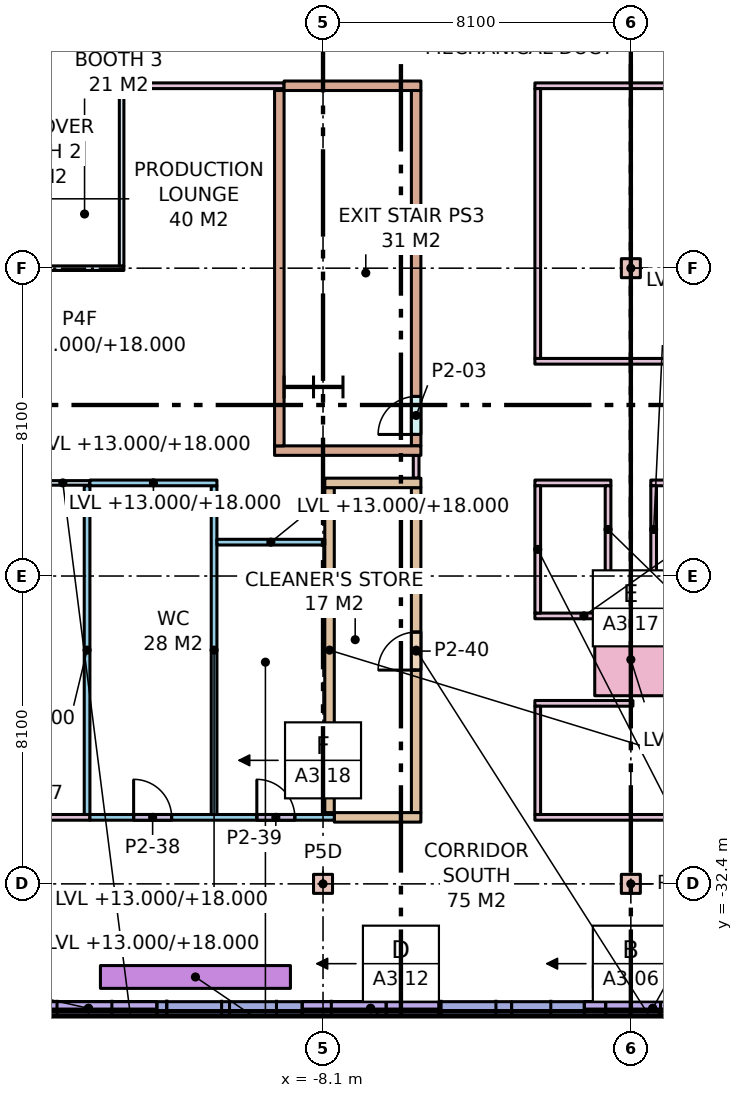
"""IFC4 building model, lengths in metres.
Left out: names, types, materials, properties, quantities, classifications, styles, units other than length and angle.
Written with IfcOpenShell. Run it as: python <this file> out.ifc"""

import sys

from ifc_helpers import new_model, si_unit, direction, frame, frame_2d, origin, origin_2d, place, context, subcontext, project, spatial, rectangle, extrude, element, fill, save


model = new_model("IFC4")
c1 = context("Model", 3, precision=1e-05, world=origin(), true_north=direction((0.0, 1.0)))
c2 = subcontext(c1, "Body", "Model", "MODEL_VIEW")
j1 = project(units=[si_unit("LENGTHUNIT", "METRE"), si_unit("PLANEANGLEUNIT", "RADIAN")], contexts=[c1])
p1 = place(None, origin())
s1 = spatial("IfcSite", under=j1, at=p1, CompositionType="ELEMENT")
p2 = place(p1, origin())
s2 = spatial("IfcBuilding", under=s1, at=p2, CompositionType="ELEMENT")
p3 = place(p2, frame((0.0, 0.0, 13.0)))
s3 = spatial("IfcBuildingStorey", under=s2, at=p3, CompositionType="ELEMENT", Elevation=13.0)
for number, where, z_axis, x_axis in (
    (1, (-8.1, -32.4, 0.0), (0.0, 0.0, 1.0), (1.0, 0.0, 0.0)),
    (2, (0.0, -32.4, 0.0), (0.0, 0.0, 1.0), (1.0, 0.0, 0.0)),
):
    element("IfcColumn", number, at=place(p3, frame(where, z_axis=z_axis, x_axis=x_axis)), inside=s3, PredefinedType="COLUMN", context=c2, shape_type="SweptSolid", body=[
        extrude(rectangle(XDim=0.5, YDim=0.5, at=origin_2d()), origin(), (0.0, 0.0, 1.0), 7.0),
    ])
p4 = place(p3, frame((0.0, -16.2, 0.0), z_axis=(0.0, 0.0, 1.0), x_axis=(1.0, 0.0, 0.0)))
e3 = element("IfcColumn", 3, at=p4, inside=s3, PredefinedType="COLUMN", context=c2, shape_type="SweptSolid", body=[
    extrude(rectangle(XDim=0.5, YDim=0.5, at=origin_2d()), origin(), (0.0, 0.0, 1.0), 5.0),
])
p5 = place(p3, frame((0.0, -26.5, 0.0), z_axis=(0.0, 0.0, 1.0), x_axis=(1.0, 0.0, 0.0)))
e4 = element("IfcColumn", 4, at=p5, inside=s3, PredefinedType="COLUMN", context=c2, shape_type="SweptSolid", body=[
    extrude(rectangle(XDim=1.9, YDim=1.9, at=origin_2d()), origin(), (0.0, 0.0, 1.0), 5.0),
])
p6 = place(p3, frame((-17.984, -35.675, 0.0), z_axis=(0.0, 0.0, 1.0), x_axis=(1.0, 0.0, 0.0)))
e5 = element("IfcWall", 5, at=p6, inside=s3, PredefinedType="STANDARD", context=c2, shape_type="SweptSolid", body=[
    extrude(rectangle(XDim=7.424, YDim=0.35, at=frame_2d((3.712, 0.0))), origin(), (0.0, 0.0, 1.0), 5.0),
])
p7 = place(p6, frame((1.912, 0.0, 1.0)))
e6 = element("IfcOpeningElement", 6, at=p7, cuts=e5, PredefinedType="OPENING", context=c2, shape_type="SweptSolid", body=[
    extrude(rectangle(XDim=3.6, YDim=4.0, at=frame_2d((1.8, 2.0))), frame((0.0, 0.185, 0.0), z_axis=(0.0, -1.0, 0.0), x_axis=(1.0, 0.0, 0.0)), (0.0, 0.0, 1.0), 0.37),
])
p8 = place(p3, frame((-10.56, -35.675, 0.0), z_axis=(0.0, 0.0, 1.0), x_axis=(1.0, 0.0, 0.0)))
e7 = element("IfcWall", 7, at=p8, inside=s3, PredefinedType="STANDARD", context=c2, shape_type="SweptSolid", body=[
    extrude(rectangle(XDim=7.424, YDim=0.35, at=frame_2d((3.712, 0.0))), origin(), (0.0, 0.0, 1.0), 5.0),
])
p9 = place(p8, frame((1.912, 0.0, 1.0)))
e8 = element("IfcOpeningElement", 8, at=p9, cuts=e7, PredefinedType="OPENING", context=c2, shape_type="SweptSolid", body=[
    extrude(rectangle(XDim=3.6, YDim=4.0, at=frame_2d((1.8, 2.0))), frame((0.0, 0.185, 0.0), z_axis=(0.0, -1.0, 0.0), x_axis=(1.0, 0.0, 0.0)), (0.0, 0.0, 1.0), 0.37),
])
p10 = place(p3, frame((-3.136, -35.675, 0.0), z_axis=(0.0, 0.0, 1.0), x_axis=(1.0, 0.0, 0.0)))
e9 = element("IfcWall", 9, at=p10, inside=s3, PredefinedType="STANDARD", context=c2, shape_type="SweptSolid", body=[
    extrude(rectangle(XDim=7.424, YDim=0.35, at=frame_2d((3.712, 0.0))), origin(), (0.0, 0.0, 1.0), 5.0),
])
p11 = place(p10, frame((1.912, 0.0, 1.0)))
e10 = element("IfcOpeningElement", 10, at=p11, cuts=e9, PredefinedType="OPENING", context=c2, shape_type="SweptSolid", body=[
    extrude(rectangle(XDim=3.6, YDim=4.0, at=frame_2d((1.8, 2.0))), frame((0.0, 0.185, 0.0), z_axis=(0.0, -1.0, 0.0), x_axis=(1.0, 0.0, 0.0)), (0.0, 0.0, 1.0), 0.37),
])
for number, where, z_axis, x_axis in (
    (11, (-13.958, -34.85, 7.0), (0.0, 0.0, 1.0), (1.0, 0.0, 0.0)),
    (12, (-0.986, -34.85, 7.0), (0.0, 0.0, 1.0), (1.0, 0.0, 0.0)),
):
    element("IfcWall", number, at=place(p3, frame(where, z_axis=z_axis, x_axis=x_axis)), inside=s3, PredefinedType="PARAPET", context=c2, shape_type="SweptSolid", body=[
        extrude(rectangle(XDim=5.0, YDim=0.6, at=frame_2d((2.5, 0.0))), origin(), (0.0, 0.0, 1.0), 0.9),
    ])
p12 = place(p3, frame((-0.675, -24.3, 0.0), z_axis=(0.0, 0.0, 1.0), x_axis=(1.0, 0.0, 0.0)))
e13 = element("IfcWall", 13, at=p12, inside=s3, PredefinedType="PARTITIONING", context=c2, shape_type="SweptSolid", body=[
    extrude(rectangle(XDim=1.35, YDim=0.15, at=frame_2d((0.675, 0.0))), origin(), (0.0, 0.0, 1.0), 6.68),
])
p13 = place(p3, frame((-2.525, -21.85, 0.0), z_axis=(0.0, 0.0, 1.0), x_axis=(1.0, 0.0, 0.0)))
e14 = element("IfcWall", 14, at=p13, inside=s3, PredefinedType="PARTITIONING", context=c2, shape_type="SweptSolid", body=[
    extrude(rectangle(XDim=2.0, YDim=0.15, at=frame_2d((1.0, 0.0))), origin(), (0.0, 0.0, 1.0), 5.0),
])
p14 = place(p3, frame((0.525, -21.85, 0.0), z_axis=(0.0, 0.0, 1.0), x_axis=(1.0, 0.0, 0.0)))
e15 = element("IfcWall", 15, at=p14, inside=s3, PredefinedType="PARTITIONING", context=c2, shape_type="SweptSolid", body=[
    extrude(rectangle(XDim=15.15, YDim=0.15, at=frame_2d((7.575, 0.0))), origin(), (0.0, 0.0, 1.0), 5.0),
])
p15 = place(p14, frame((4.35, 0.0, 0.0)))
e16 = element("IfcOpeningElement", 16, at=p15, cuts=e15, PredefinedType="OPENING", context=c2, shape_type="SweptSolid", body=[
    extrude(rectangle(XDim=1.0, YDim=2.1, at=frame_2d((0.5, 1.05))), frame((0.0, 0.085, 0.0), z_axis=(0.0, -1.0, 0.0), x_axis=(1.0, 0.0, 0.0)), (0.0, 0.0, 1.0), 0.17),
])
p16 = place(p14, frame((11.924, 0.0, 0.0)))
e17 = element("IfcOpeningElement", 17, at=p16, cuts=e15, PredefinedType="OPENING", context=c2, shape_type="SweptSolid", body=[
    extrude(rectangle(XDim=1.0, YDim=2.1, at=frame_2d((0.5, 1.05))), frame((0.0, 0.085, 0.0), z_axis=(0.0, -1.0, 0.0), x_axis=(1.0, 0.0, 0.0)), (0.0, 0.0, 1.0), 0.17),
])
for number, where, z_axis, x_axis in (
    (18, (-0.6, -24.225, 0.0), (0.0, 0.0, 1.0), (0.0, 1.0, 0.0)),
    (19, (0.6, -24.225, 0.0), (0.0, 0.0, 1.0), (0.0, 1.0, 0.0)),
):
    element("IfcWall", number, at=place(p3, frame(where, z_axis=z_axis, x_axis=x_axis)), inside=s3, PredefinedType="PARTITIONING", context=c2, shape_type="SweptSolid", body=[
        extrude(rectangle(XDim=2.3, YDim=0.15, at=frame_2d((1.15, 0.0))), origin(), (0.0, 0.0, 1.0), 5.0),
    ])
p17 = place(p3, frame((-2.525, -30.65, 0.0), z_axis=(0.0, 0.0, 1.0), x_axis=(1.0, 0.0, 0.0)))
e20 = element("IfcWall", 20, at=p17, inside=s3, PredefinedType="PARTITIONING", context=c2, shape_type="SweptSolid", body=[
    extrude(rectangle(XDim=25.378, YDim=0.15, at=frame_2d((12.689, 0.0))), origin(), (0.0, 0.0, 1.0), 6.68),
])
p18 = place(p3, frame((-2.525, -27.65, 0.0), z_axis=(0.0, 0.0, 1.0), x_axis=(1.0, 0.0, 0.0)))
e21 = element("IfcWall", 21, at=p18, inside=s3, PredefinedType="PARTITIONING", context=c2, shape_type="SweptSolid", body=[
    extrude(rectangle(XDim=2.58, YDim=0.15, at=frame_2d((1.29, 0.0))), origin(), (0.0, 0.0, 1.0), 6.68),
])
p19 = place(p3, frame((-2.525, -25.35, 0.0), z_axis=(0.0, 0.0, 1.0), x_axis=(1.0, 0.0, 0.0)))
e22 = element("IfcWall", 22, at=p19, inside=s3, PredefinedType="PARTITIONING", context=c2, shape_type="SweptSolid", body=[
    extrude(rectangle(XDim=2.58, YDim=0.15, at=frame_2d((1.29, 0.0))), origin(), (0.0, 0.0, 1.0), 5.0),
])
p20 = place(p3, frame((-2.45, -30.575, 0.0), z_axis=(0.0, 0.0, 1.0), x_axis=(0.0, 1.0, 0.0)))
e23 = element("IfcWall", 23, at=p20, inside=s3, PredefinedType="PARTITIONING", context=c2, shape_type="SweptSolid", body=[
    extrude(rectangle(XDim=2.85, YDim=0.15, at=frame_2d((1.425, 0.0))), origin(), (0.0, 0.0, 1.0), 6.68),
])
p21 = place(p3, frame((-2.45, -25.275, 0.0), z_axis=(0.0, 0.0, 1.0), x_axis=(0.0, 1.0, 0.0)))
e24 = element("IfcWall", 24, at=p21, inside=s3, PredefinedType="PARTITIONING", context=c2, shape_type="SweptSolid", body=[
    extrude(rectangle(XDim=3.35, YDim=0.15, at=frame_2d((1.675, 0.0))), origin(), (0.0, 0.0, 1.0), 5.0),
])
p22 = place(p3, frame((-9.125, -11.4, 0.0), z_axis=(0.0, 0.0, 1.0), x_axis=(1.0, 0.0, 0.0)))
e25 = element("IfcWall", 25, at=p22, inside=s3, PredefinedType="STANDARD", context=c2, shape_type="SweptSolid", body=[
    extrude(rectangle(XDim=3.6, YDim=0.25, at=frame_2d((1.8, 0.0))), origin(), (0.0, 0.0, 1.0), 5.0),
])
p23 = place(p3, frame((-5.65, -20.875, 0.0), z_axis=(0.0, 0.0, 1.0), x_axis=(0.0, 1.0, 0.0)))
e26 = element("IfcWall", 26, at=p23, inside=s3, PredefinedType="STANDARD", context=c2, shape_type="SweptSolid", body=[
    extrude(rectangle(XDim=9.35, YDim=0.25, at=frame_2d((4.675, 0.0))), origin(), (0.0, 0.0, 1.0), 5.0),
])
p24 = place(p23, frame((0.3, 0.0, 0.0)))
e27 = element("IfcOpeningElement", 27, at=p24, cuts=e26, PredefinedType="OPENING", context=c2, shape_type="SweptSolid", body=[
    extrude(rectangle(XDim=1.0, YDim=2.1, at=frame_2d((0.5, 1.05))), frame((0.0, 0.135, 0.0), z_axis=(0.0, -1.0, 0.0), x_axis=(1.0, 0.0, 0.0)), (0.0, 0.0, 1.0), 0.27),
])
p25 = place(p3, frame((-9.375, -21.0, 0.0), z_axis=(0.0, 0.0, 1.0), x_axis=(1.0, 0.0, 0.0)))
e28 = element("IfcWall", 28, at=p25, inside=s3, PredefinedType="STANDARD", context=c2, shape_type="SweptSolid", body=[
    extrude(rectangle(XDim=3.85, YDim=0.25, at=frame_2d((1.925, 0.0))), origin(), (0.0, 0.0, 1.0), 5.0),
])
p26 = place(p3, frame((-9.25, -20.875, 0.0), z_axis=(0.0, 0.0, 1.0), x_axis=(0.0, 1.0, 0.0)))
e29 = element("IfcWall", 29, at=p26, inside=s3, PredefinedType="STANDARD", context=c2, shape_type="SweptSolid", body=[
    extrude(rectangle(XDim=9.35, YDim=0.25, at=frame_2d((4.675, 0.0))), origin(), (0.0, 0.0, 1.0), 5.0),
])
p27 = place(p3, frame((-2.525, -11.4, 0.0), z_axis=(0.0, 0.0, 1.0), x_axis=(1.0, 0.0, 0.0)))
e30 = element("IfcWall", 30, at=p27, inside=s3, PredefinedType="PARTITIONING", context=c2, shape_type="SweptSolid", body=[
    extrude(rectangle(XDim=16.05, YDim=0.15, at=frame_2d((8.025, 0.0))), origin(), (0.0, 0.0, 1.0), 5.0),
])
p28 = place(p3, frame((-13.4, -11.325, 0.0), z_axis=(0.0, 0.0, 1.0), x_axis=(0.0, 1.0, 0.0)))
e31 = element("IfcWall", 31, at=p28, inside=s3, PredefinedType="PARTITIONING", context=c2, shape_type="SweptSolid", body=[
    extrude(rectangle(XDim=5.6, YDim=0.15, at=frame_2d((2.8, 0.0))), origin(), (0.0, 0.0, 1.0), 5.0),
])
p29 = place(p28, frame((2.25, 0.0, 0.0)))
e32 = element("IfcOpeningElement", 32, at=p29, cuts=e31, PredefinedType="OPENING", context=c2, shape_type="SweptSolid", body=[
    extrude(rectangle(XDim=1.0, YDim=2.1, at=frame_2d((0.5, 1.05))), frame((0.0, 0.085, 0.0), z_axis=(0.0, -1.0, 0.0), x_axis=(1.0, 0.0, 0.0)), (0.0, 0.0, 1.0), 0.17),
])
p30 = place(p3, frame((-13.475, -11.4, 0.0), z_axis=(0.0, 0.0, 1.0), x_axis=(1.0, 0.0, 0.0)))
e33 = element("IfcWall", 33, at=p30, inside=s3, PredefinedType="PARTITIONING", context=c2, shape_type="SweptSolid", body=[
    extrude(rectangle(XDim=4.35, YDim=0.15, at=frame_2d((2.175, 0.0))), origin(), (0.0, 0.0, 1.0), 5.0),
])
p31 = place(p3, frame((-2.525, -18.65, 0.0), z_axis=(0.0, 0.0, 1.0), x_axis=(1.0, 0.0, 0.0)))
e34 = element("IfcWall", 34, at=p31, inside=s3, PredefinedType="PARTITIONING", context=c2, shape_type="SweptSolid", body=[
    extrude(rectangle(XDim=20.303, YDim=0.15, at=frame_2d((10.152, 0.0))), origin(), (0.0, 0.0, 1.0), 5.0),
])
p32 = place(p31, frame((9.65, 0.0, 0.0)))
e35 = element("IfcOpeningElement", 35, at=p32, cuts=e34, PredefinedType="OPENING", context=c2, shape_type="SweptSolid", body=[
    extrude(rectangle(XDim=1.0, YDim=2.1, at=frame_2d((0.5, 1.05))), frame((0.0, 0.085, 0.0), z_axis=(0.0, -1.0, 0.0), x_axis=(1.0, 0.0, 0.0)), (0.0, 0.0, 1.0), 0.17),
])
p33 = place(p3, frame((-2.45, -18.575, 0.0), z_axis=(0.0, 0.0, 1.0), x_axis=(0.0, 1.0, 0.0)))
e36 = element("IfcWall", 36, at=p33, inside=s3, PredefinedType="PARTITIONING", context=c2, shape_type="SweptSolid", body=[
    extrude(rectangle(XDim=7.1, YDim=0.15, at=frame_2d((3.55, 0.0))), origin(), (0.0, 0.0, 1.0), 5.0),
])
p34 = place(p3, frame((-5.65, -30.525, 0.0), z_axis=(0.0, 0.0, 1.0), x_axis=(0.0, 1.0, 0.0)))
e37 = element("IfcWall", 37, at=p34, inside=s3, PredefinedType="PARTITIONING", context=c2, shape_type="SweptSolid", body=[
    extrude(rectangle(XDim=8.55, YDim=0.25, at=frame_2d((4.275, 0.0))), origin(), (0.0, 0.0, 1.0), 5.0),
])
p35 = place(p34, frame((3.75, 0.0, 0.0)))
e38 = element("IfcOpeningElement", 38, at=p35, cuts=e37, PredefinedType="OPENING", context=c2, shape_type="SweptSolid", body=[
    extrude(rectangle(XDim=1.0, YDim=2.1, at=frame_2d((0.5, 1.05))), frame((0.0, 0.135, 0.0), z_axis=(0.0, -1.0, 0.0), x_axis=(1.0, 0.0, 0.0)), (0.0, 0.0, 1.0), 0.27),
])
p36 = place(p3, frame((-5.65, -21.725, 0.0), z_axis=(0.0, 0.0, 1.0), x_axis=(0.0, 1.0, 0.0)))
e39 = element("IfcWall", 39, at=p36, inside=s3, PredefinedType="PARTITIONING", context=c2, shape_type="SweptSolid", body=[
    extrude(rectangle(XDim=0.6, YDim=0.15, at=frame_2d((0.3, 0.0))), origin(), (0.0, 0.0, 1.0), 5.0),
])
p37 = place(p3, frame((-7.804, -30.65, 0.0), z_axis=(0.0, 0.0, 1.0), x_axis=(1.0, 0.0, 0.0)))
e40 = element("IfcWall", 40, at=p37, inside=s3, PredefinedType="PARTITIONING", context=c2, shape_type="SweptSolid", body=[
    extrude(rectangle(XDim=2.279, YDim=0.25, at=frame_2d((1.139, 0.0))), origin(), (0.0, 0.0, 1.0), 6.68),
])
p38 = place(p3, frame((-14.234, -30.65, 0.0), z_axis=(0.0, 0.0, 1.0), x_axis=(1.0, 0.0, 0.0)))
e41 = element("IfcWall", 41, at=p38, inside=s3, PredefinedType="PARTITIONING", context=c2, shape_type="SweptSolid", body=[
    extrude(rectangle(XDim=6.43, YDim=0.15, at=frame_2d((3.215, 0.0))), origin(), (0.0, 0.0, 1.0), 6.68),
])
p39 = place(p38, frame((1.15, 0.0, 0.0)))
e42 = element("IfcOpeningElement", 42, at=p39, cuts=e41, PredefinedType="OPENING", context=c2, shape_type="SweptSolid", body=[
    extrude(rectangle(XDim=1.0, YDim=2.1, at=frame_2d((0.5, 1.05))), frame((0.0, 0.085, 0.0), z_axis=(0.0, -1.0, 0.0), x_axis=(1.0, 0.0, 0.0)), (0.0, 0.0, 1.0), 0.17),
])
p40 = place(p38, frame((4.392, 0.0, 0.0)))
e43 = element("IfcOpeningElement", 43, at=p40, cuts=e41, PredefinedType="OPENING", context=c2, shape_type="SweptSolid", body=[
    extrude(rectangle(XDim=1.0, YDim=2.1, at=frame_2d((0.5, 1.05))), frame((0.0, 0.085, 0.0), z_axis=(0.0, -1.0, 0.0), x_axis=(1.0, 0.0, 0.0)), (0.0, 0.0, 1.0), 0.17),
])
p41 = place(p3, frame((-27.28, -30.65, 0.0), z_axis=(0.0, 0.0, 1.0), x_axis=(1.0, 0.0, 0.0)))
e44 = element("IfcWall", 44, at=p41, inside=s3, PredefinedType="PARTITIONING", context=c2, shape_type="SweptSolid", body=[
    extrude(rectangle(XDim=13.046, YDim=0.15, at=frame_2d((6.523, 0.0))), origin(), (0.0, 0.0, 1.0), 6.68),
])
p42 = place(p41, frame((2.25, 0.0, 0.0)))
e45 = element("IfcOpeningElement", 45, at=p42, cuts=e44, PredefinedType="OPENING", context=c2, shape_type="SweptSolid", body=[
    extrude(rectangle(XDim=1.0, YDim=2.1, at=frame_2d((0.5, 1.05))), frame((0.0, 0.085, 0.0), z_axis=(0.0, -1.0, 0.0), x_axis=(1.0, 0.0, 0.0)), (0.0, 0.0, 1.0), 0.17),
])
p43 = place(p41, frame((8.785, 0.0, 0.0)))
e46 = element("IfcOpeningElement", 46, at=p43, cuts=e44, PredefinedType="OPENING", context=c2, shape_type="SweptSolid", body=[
    extrude(rectangle(XDim=1.0, YDim=2.1, at=frame_2d((0.5, 1.05))), frame((0.0, 0.085, 0.0), z_axis=(0.0, -1.0, 0.0), x_axis=(1.0, 0.0, 0.0)), (0.0, 0.0, 1.0), 0.17),
])
p44 = place(p3, frame((-15.94, -16.2, 0.0), z_axis=(0.0, 0.0, 1.0), x_axis=(1.0, 0.0, 0.0)))
e47 = element("IfcWall", 47, at=p44, inside=s3, PredefinedType="PARTITIONING", context=c2, shape_type="SweptSolid", body=[
    extrude(rectangle(XDim=2.6, YDim=0.12, at=frame_2d((1.3, 0.0))), origin(), (0.0, 0.0, 1.0), 5.0),
])
p45 = place(p3, frame((-13.4, -16.14, 0.0), z_axis=(0.0, 0.0, 1.0), x_axis=(0.0, 1.0, 0.0)))
e48 = element("IfcWall", 48, at=p45, inside=s3, PredefinedType="PARTITIONING", context=c2, shape_type="SweptSolid", body=[
    extrude(rectangle(XDim=4.665, YDim=0.12, at=frame_2d((2.333, 0.0))), origin(), (0.0, 0.0, 1.0), 5.0),
])
p46 = place(p3, frame((-7.929, -30.525, 0.0), z_axis=(0.0, 0.0, 1.0), x_axis=(0.0, 1.0, 0.0)))
e49 = element("IfcWall", 49, at=p46, inside=s3, PredefinedType="PARTITIONING", context=c2, shape_type="SweptSolid", body=[
    extrude(rectangle(XDim=8.55, YDim=0.25, at=frame_2d((4.275, 0.0))), origin(), (0.0, 0.0, 1.0), 5.0),
])
p47 = place(p3, frame((-10.967, -30.575, 0.0), z_axis=(0.0, 0.0, 1.0), x_axis=(0.0, 1.0, 0.0)))
e50 = element("IfcWall", 50, at=p47, inside=s3, PredefinedType="PARTITIONING", context=c2, shape_type="SweptSolid", body=[
    extrude(rectangle(XDim=8.65, YDim=0.15, at=frame_2d((4.325, 0.0))), origin(), (0.0, 0.0, 1.0), 5.0),
])
p48 = place(p3, frame((-10.892, -23.409, 0.0), z_axis=(0.0, 0.0, 1.0), x_axis=(1.0, 0.0, 0.0)))
e51 = element("IfcWall", 51, at=p48, inside=s3, PredefinedType="PARTITIONING", context=c2, shape_type="SweptSolid", body=[
    extrude(rectangle(XDim=2.838, YDim=0.15, at=frame_2d((1.419, 0.0))), origin(), (0.0, 0.0, 1.0), 5.0),
])
p49 = place(p3, frame((-8.054, -21.85, 0.0), z_axis=(0.0, 0.0, 1.0), x_axis=(1.0, 0.0, 0.0)))
e52 = element("IfcWall", 52, at=p49, inside=s3, PredefinedType="PARTITIONING", context=c2, shape_type="SweptSolid", body=[
    extrude(rectangle(XDim=2.529, YDim=0.25, at=frame_2d((1.264, 0.0))), origin(), (0.0, 0.0, 1.0), 5.0),
])
p50 = place(p3, frame((-14.234, -21.85, 0.0), z_axis=(0.0, 0.0, 1.0), x_axis=(1.0, 0.0, 0.0)))
e53 = element("IfcWall", 53, at=p50, inside=s3, PredefinedType="PARTITIONING", context=c2, shape_type="SweptSolid", body=[
    extrude(rectangle(XDim=3.342, YDim=0.15, at=frame_2d((1.671, 0.0))), origin(), (0.0, 0.0, 1.0), 5.0),
])
p51 = place(p3, frame((-14.309, -30.575, 0.0), z_axis=(0.0, 0.0, 1.0), x_axis=(0.0, 1.0, 0.0)))
e54 = element("IfcWall", 54, at=p51, inside=s3, PredefinedType="PARTITIONING", context=c2, shape_type="SweptSolid", body=[
    extrude(rectangle(XDim=8.65, YDim=0.15, at=frame_2d((4.325, 0.0))), origin(), (0.0, 0.0, 1.0), 5.0),
])
p52 = place(p3, frame((-15.66, -21.85, 0.0), z_axis=(0.0, 0.0, 1.0), x_axis=(1.0, 0.0, 0.0)))
e55 = element("IfcWall", 55, at=p52, inside=s3, PredefinedType="PARTITIONING", context=c2, shape_type="SweptSolid", body=[
    extrude(rectangle(XDim=1.426, YDim=0.12, at=frame_2d((0.713, 0.0))), origin(), (0.0, 0.0, 1.0), 5.0),
])
p53 = place(p7, origin())
e56 = element("IfcWindow", 56, at=p53, inside=s3, PartitioningType="SINGLE_PANEL", PredefinedType="WINDOW", context=c2, shape_type="SweptSolid", body=[
    extrude(rectangle(XDim=3.6, YDim=4.0, at=frame_2d((1.8, 2.0))), frame((0.0, 0.03, 0.0), z_axis=(0.0, -1.0, 0.0), x_axis=(1.0, 0.0, 0.0)), (0.0, 0.0, 1.0), 0.06),
])
fill(e6, e56)
p54 = place(p9, origin())
e57 = element("IfcWindow", 57, at=p54, inside=s3, PartitioningType="SINGLE_PANEL", PredefinedType="WINDOW", context=c2, shape_type="SweptSolid", body=[
    extrude(rectangle(XDim=3.6, YDim=4.0, at=frame_2d((1.8, 2.0))), frame((0.0, 0.03, 0.0), z_axis=(0.0, -1.0, 0.0), x_axis=(1.0, 0.0, 0.0)), (0.0, 0.0, 1.0), 0.06),
])
fill(e8, e57)
p55 = place(p11, origin())
e58 = element("IfcWindow", 58, at=p55, inside=s3, PartitioningType="SINGLE_PANEL", PredefinedType="WINDOW", context=c2, shape_type="SweptSolid", body=[
    extrude(rectangle(XDim=3.6, YDim=4.0, at=frame_2d((1.8, 2.0))), frame((0.0, 0.03, 0.0), z_axis=(0.0, -1.0, 0.0), x_axis=(1.0, 0.0, 0.0)), (0.0, 0.0, 1.0), 0.06),
])
fill(e10, e58)
p56 = place(p24, origin())
e59 = element("IfcDoor", 59, at=p56, inside=s3, OperationType="SINGLE_SWING_LEFT", PredefinedType="DOOR", context=c2, shape_type="SweptSolid", body=[
    extrude(rectangle(XDim=1.0, YDim=2.1, at=frame_2d((0.5, 1.05))), frame((0.0, 0.025, 0.0), z_axis=(0.0, -1.0, 0.0), x_axis=(1.0, 0.0, 0.0)), (0.0, 0.0, 1.0), 0.05),
])
fill(e27, e59)
p57 = place(p39, origin())
e60 = element("IfcDoor", 60, at=p57, inside=s3, OperationType="SINGLE_SWING_LEFT", PredefinedType="DOOR", context=c2, shape_type="SweptSolid", body=[
    extrude(rectangle(XDim=1.0, YDim=2.1, at=frame_2d((0.5, 1.05))), frame((0.0, 0.025, 0.0), z_axis=(0.0, -1.0, 0.0), x_axis=(1.0, 0.0, 0.0)), (0.0, 0.0, 1.0), 0.05),
])
fill(e42, e60)
p58 = place(p40, origin())
e61 = element("IfcDoor", 61, at=p58, inside=s3, OperationType="SINGLE_SWING_LEFT", PredefinedType="DOOR", context=c2, shape_type="SweptSolid", body=[
    extrude(rectangle(XDim=1.0, YDim=2.1, at=frame_2d((0.5, 1.05))), frame((0.0, 0.025, 0.0), z_axis=(0.0, -1.0, 0.0), x_axis=(1.0, 0.0, 0.0)), (0.0, 0.0, 1.0), 0.05),
])
fill(e43, e61)
p59 = place(p35, origin())
e62 = element("IfcDoor", 62, at=p59, inside=s3, OperationType="SINGLE_SWING_LEFT", PredefinedType="DOOR", context=c2, shape_type="SweptSolid", body=[
    extrude(rectangle(XDim=1.0, YDim=2.1, at=frame_2d((0.5, 1.05))), frame((0.0, 0.025, 0.0), z_axis=(0.0, -1.0, 0.0), x_axis=(1.0, 0.0, 0.0)), (0.0, 0.0, 1.0), 0.05),
])
fill(e38, e62)
save(model, sys.argv[1])
